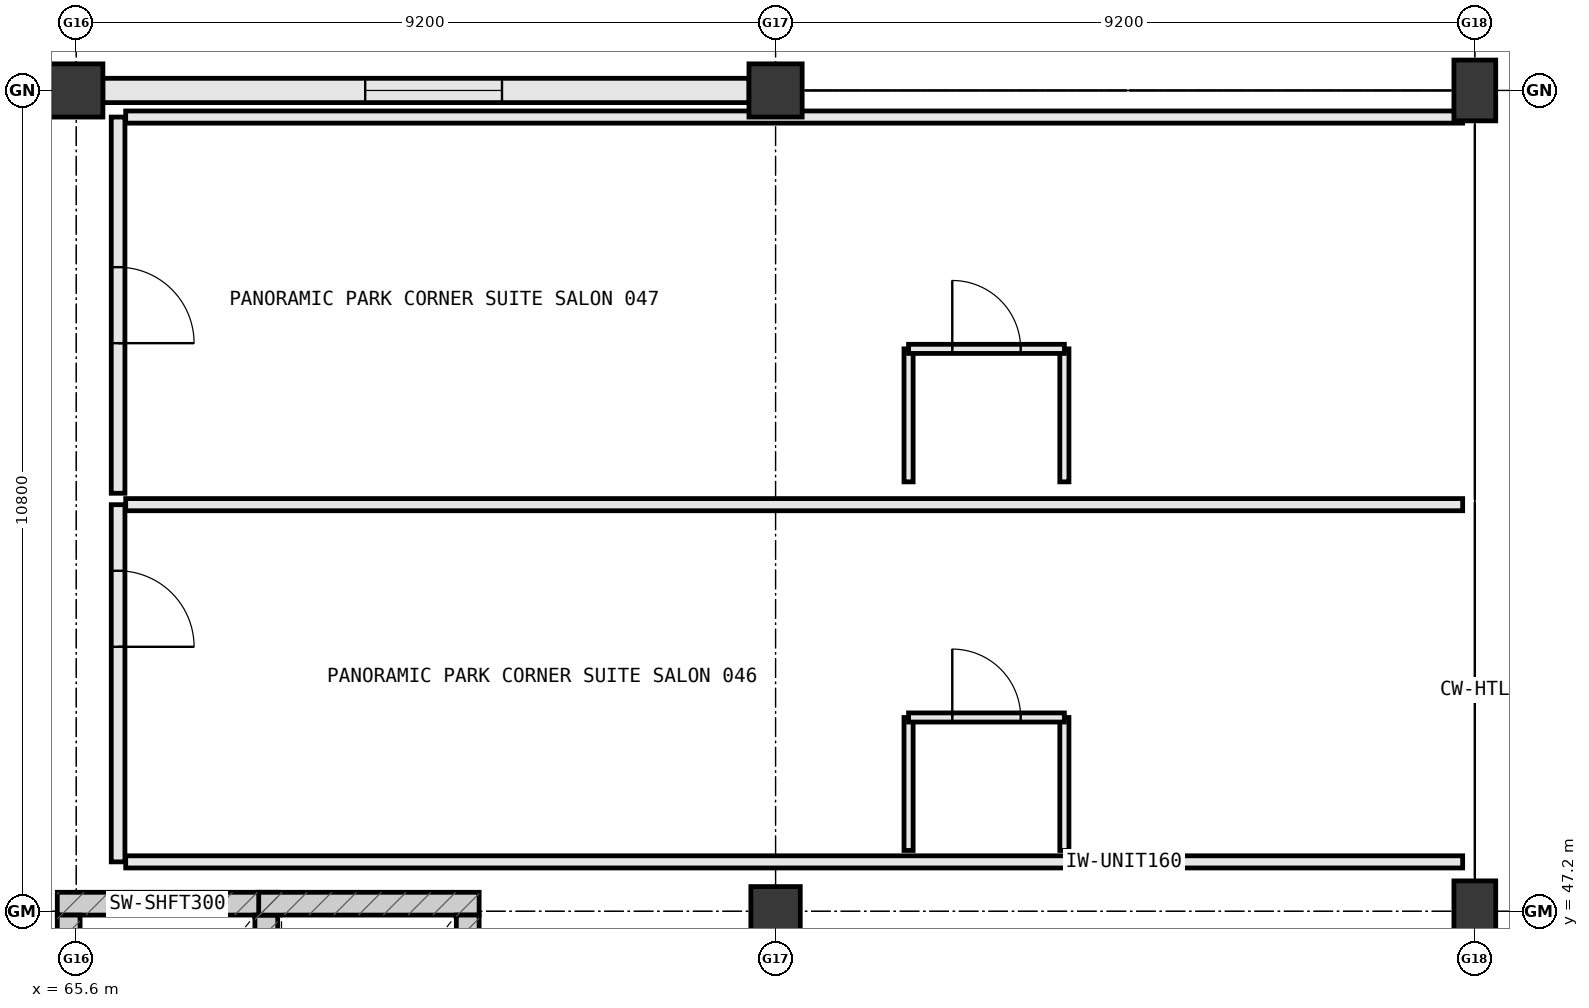
"""IFC4 building model, lengths in metres.
Left out: names, types, materials, properties, quantities, classifications, styles, units other than length and angle.
Written with IfcOpenShell. Run it as: python <this file> out.ifc"""

import sys

from ifc_helpers import new_model, si_unit, direction, frame, frame_2d, origin, origin_2d, place, context, subcontext, project, spatial, rectangle, extrude, element, fill, save


model = new_model("IFC4")
c1 = context("Model", 3, precision=1e-05, world=origin(), true_north=direction((0.0, 1.0)))
c2 = subcontext(c1, "Body", "Model", "MODEL_VIEW")
j1 = project(units=[si_unit("LENGTHUNIT", "METRE"), si_unit("PLANEANGLEUNIT", "RADIAN")], contexts=[c1])
p1 = place(None, origin())
s1 = spatial("IfcSite", under=j1, at=p1, CompositionType="ELEMENT")
p2 = place(p1, origin())
s2 = spatial("IfcBuilding", under=s1, at=p2, CompositionType="ELEMENT")
p3 = place(p2, frame((0.0, 0.0, 10.8)))
s3 = spatial("IfcBuildingStorey", under=s2, at=p3, CompositionType="ELEMENT", Elevation=10.8)
p4 = place(p3, frame((74.8, 47.2, 0.0), z_axis=(0.0, 0.0, 1.0), x_axis=(1.0, 0.0, 0.0)))
e1 = element("IfcColumn", 1, at=p4, inside=s3, PredefinedType="COLUMN", context=c2, shape_type="SweptSolid", body=[
    extrude(rectangle(XDim=0.65, YDim=0.65, at=origin_2d()), origin(), (0.0, 0.0, 1.0), 5.4),
])
p5 = place(p3, frame((74.8, 58.0, 0.0), z_axis=(0.0, 0.0, 1.0), x_axis=(1.0, 0.0, 0.0)))
e2 = element("IfcColumn", 2, at=p5, inside=s3, PredefinedType="COLUMN", context=c2, shape_type="SweptSolid", body=[
    extrude(rectangle(XDim=0.7, YDim=0.7, at=origin_2d()), origin(), (0.0, 0.0, 1.0), 5.4),
])
for number, where, z_axis, x_axis in (
    (3, (84.0, 47.2, 0.0), (0.0, 0.0, 1.0), (1.0, 0.0, 0.0)),
    (4, (84.0, 58.0, 0.0), (0.0, 0.0, 1.0), (1.0, 0.0, 0.0)),
):
    element("IfcColumn", number, at=place(p3, frame(where, z_axis=z_axis, x_axis=x_axis)), inside=s3, PredefinedType="PILASTER", context=c2, shape_type="SweptSolid", body=[
        extrude(rectangle(XDim=0.55, YDim=0.8, at=origin_2d()), origin(), (0.0, 0.0, 1.0), 5.4),
    ])
p6 = place(p3, frame((65.6, 58.0, 0.0), z_axis=(0.0, 0.0, 1.0), x_axis=(1.0, 0.0, 0.0)))
e5 = element("IfcColumn", 5, at=p6, inside=s3, PredefinedType="COLUMN", context=c2, shape_type="SweptSolid", body=[
    extrude(rectangle(XDim=0.7, YDim=0.7, at=origin_2d()), origin(), (0.0, 0.0, 1.0), 5.4),
])
p7 = place(p3, frame((74.452, 58.0, 0.0), z_axis=(0.0, 0.0, 1.0), x_axis=(-1.0, 0.0, 0.0)))
e6 = element("IfcWall", 6, at=p7, inside=s3, PredefinedType="STANDARD", context=c2, shape_type="SweptSolid", body=[
    extrude(rectangle(XDim=8.504, YDim=0.32, at=frame_2d((4.252, 0.0))), origin(), (0.0, 0.0, 1.0), 4.183),
])
p8 = place(p7, frame((3.251, 0.0, 0.85)))
e7 = element("IfcOpeningElement", 7, at=p8, cuts=e6, PredefinedType="OPENING", context=c2, shape_type="SweptSolid", body=[
    extrude(rectangle(XDim=1.8, YDim=1.85, at=frame_2d((0.9, 0.925))), frame((0.0, 0.172, 0.0), z_axis=(0.0, -1.0, 0.0), x_axis=(1.0, 0.0, 0.0)), (0.0, 0.0, 1.0), 0.344),
])
for number, where, z_axis, x_axis in (
    (8, (68.25, 47.3, 0.0), (0.0, 0.0, 1.0), (-1.0, 0.0, 0.0)),
    (9, (68.1, 44.25, 0.0), (0.0, 0.0, 1.0), (0.0, 1.0, 0.0)),
    (10, (65.5, 47.15, 0.0), (0.0, 0.0, 1.0), (0.0, -1.0, 0.0)),
    (11, (70.9, 47.3, 0.0), (0.0, 0.0, 1.0), (-1.0, 0.0, 0.0)),
    (12, (70.75, 44.25, 0.0), (0.0, 0.0, 1.0), (0.0, 1.0, 0.0)),
):
    element("IfcWall", number, at=place(p3, frame(where, z_axis=z_axis, x_axis=x_axis)), inside=s3, PredefinedType="SHEAR", context=c2, shape_type="SweptSolid", body=[
        extrude(rectangle(XDim=2.9, YDim=0.3, at=frame_2d((1.45, 0.0))), origin(), (0.0, 0.0, 1.0), 5.4),
    ])
p9 = place(p3, frame((66.15, 52.55, 0.0), z_axis=(0.0, 0.0, 1.0), x_axis=(0.0, -1.0, 0.0)))
e13 = element("IfcWall", 13, at=p9, inside=s3, PredefinedType="PARTITIONING", context=c2, shape_type="SweptSolid", body=[
    extrude(rectangle(XDim=4.7, YDim=0.18, at=frame_2d((2.35, 0.0))), origin(), (0.0, 0.0, 1.0), 4.8),
])
p10 = place(p9, frame((0.87, 0.0, 0.0)))
e14 = element("IfcOpeningElement", 14, at=p10, cuts=e13, PredefinedType="OPENING", context=c2, shape_type="SweptSolid", body=[
    extrude(rectangle(XDim=1.0, YDim=2.2, at=frame_2d((0.5, 1.1))), frame((0.0, 0.102, 0.0), z_axis=(0.0, -1.0, 0.0), x_axis=(1.0, 0.0, 0.0)), (0.0, 0.0, 1.0), 0.204),
])
for number, where, z_axis, x_axis in (
    (15, (66.25, 47.85, 0.0), (0.0, 0.0, 1.0), (1.0, 0.0, 0.0)),
    (16, (66.25, 52.55, 0.0), (0.0, 0.0, 1.0), (1.0, 0.0, 0.0)),
):
    element("IfcWall", number, at=place(p3, frame(where, z_axis=z_axis, x_axis=x_axis)), inside=s3, PredefinedType="PARTITIONING", context=c2, shape_type="SweptSolid", body=[
        extrude(rectangle(XDim=17.59, YDim=0.16, at=frame_2d((8.795, 0.0))), origin(), (0.0, 0.0, 1.0), 4.8),
    ])
for number, where, z_axis, x_axis in (
    (17, (76.55, 48.0, 0.0), (0.0, 0.0, 1.0), (0.0, 1.0, 0.0)),
    (18, (78.6, 48.0, 0.0), (0.0, 0.0, 1.0), (0.0, 1.0, 0.0)),
):
    element("IfcWall", number, at=place(p3, frame(where, z_axis=z_axis, x_axis=x_axis)), inside=s3, PredefinedType="PARTITIONING", context=c2, shape_type="SweptSolid", body=[
        extrude(rectangle(XDim=1.75, YDim=0.12, at=frame_2d((0.875, 0.0))), origin(), (0.0, 0.0, 1.0), 4.8),
    ])
p11 = place(p3, frame((76.55, 49.75, 0.0), z_axis=(0.0, 0.0, 1.0), x_axis=(1.0, 0.0, 0.0)))
e19 = element("IfcWall", 19, at=p11, inside=s3, PredefinedType="PARTITIONING", context=c2, shape_type="SweptSolid", body=[
    extrude(rectangle(XDim=2.05, YDim=0.12, at=frame_2d((1.025, 0.0))), origin(), (0.0, 0.0, 1.0), 4.8),
])
p12 = place(p11, frame((0.575, 0.0, 0.0)))
e20 = element("IfcOpeningElement", 20, at=p12, cuts=e19, PredefinedType="OPENING", context=c2, shape_type="SweptSolid", body=[
    extrude(rectangle(XDim=0.9, YDim=2.15, at=frame_2d((0.45, 1.075))), frame((0.0, 0.072, 0.0), z_axis=(0.0, -1.0, 0.0), x_axis=(1.0, 0.0, 0.0)), (0.0, 0.0, 1.0), 0.144),
])
p13 = place(p3, frame((66.15, 57.65, 0.0), z_axis=(0.0, 0.0, 1.0), x_axis=(0.0, -1.0, 0.0)))
e21 = element("IfcWall", 21, at=p13, inside=s3, PredefinedType="PARTITIONING", context=c2, shape_type="SweptSolid", body=[
    extrude(rectangle(XDim=4.95, YDim=0.18, at=frame_2d((2.475, 0.0))), origin(), (0.0, 0.0, 1.0), 4.8),
])
p14 = place(p13, frame((1.975, 0.0, 0.0)))
e22 = element("IfcOpeningElement", 22, at=p14, cuts=e21, PredefinedType="OPENING", context=c2, shape_type="SweptSolid", body=[
    extrude(rectangle(XDim=1.0, YDim=2.2, at=frame_2d((0.5, 1.1))), frame((0.0, 0.102, 0.0), z_axis=(0.0, -1.0, 0.0), x_axis=(1.0, 0.0, 0.0)), (0.0, 0.0, 1.0), 0.204),
])
p15 = place(p3, frame((66.25, 57.65, 0.0), z_axis=(0.0, 0.0, 1.0), x_axis=(1.0, 0.0, 0.0)))
e23 = element("IfcWall", 23, at=p15, inside=s3, PredefinedType="PARTITIONING", context=c2, shape_type="SweptSolid", body=[
    extrude(rectangle(XDim=17.59, YDim=0.16, at=frame_2d((8.795, 0.0))), origin(), (0.0, 0.0, 1.0), 4.183),
])
for number, where, z_axis, x_axis in (
    (24, (76.55, 52.85, 0.0), (0.0, 0.0, 1.0), (0.0, 1.0, 0.0)),
    (25, (78.6, 52.85, 0.0), (0.0, 0.0, 1.0), (0.0, 1.0, 0.0)),
):
    element("IfcWall", number, at=place(p3, frame(where, z_axis=z_axis, x_axis=x_axis)), inside=s3, PredefinedType="PARTITIONING", context=c2, shape_type="SweptSolid", body=[
        extrude(rectangle(XDim=1.75, YDim=0.12, at=frame_2d((0.875, 0.0))), origin(), (0.0, 0.0, 1.0), 4.8),
    ])
p16 = place(p3, frame((76.55, 54.6, 0.0), z_axis=(0.0, 0.0, 1.0), x_axis=(1.0, 0.0, 0.0)))
e26 = element("IfcWall", 26, at=p16, inside=s3, PredefinedType="PARTITIONING", context=c2, shape_type="SweptSolid", body=[
    extrude(rectangle(XDim=2.05, YDim=0.12, at=frame_2d((1.025, 0.0))), origin(), (0.0, 0.0, 1.0), 4.8),
])
p17 = place(p16, frame((0.575, 0.0, 0.0)))
e27 = element("IfcOpeningElement", 27, at=p17, cuts=e26, PredefinedType="OPENING", context=c2, shape_type="SweptSolid", body=[
    extrude(rectangle(XDim=0.9, YDim=2.15, at=frame_2d((0.45, 1.075))), frame((0.0, 0.072, 0.0), z_axis=(0.0, -1.0, 0.0), x_axis=(1.0, 0.0, 0.0)), (0.0, 0.0, 1.0), 0.144),
])
p18 = place(p8, origin())
e28 = element("IfcWindow", 28, at=p18, inside=s3, PartitioningType="SINGLE_PANEL", PredefinedType="WINDOW", context=c2, shape_type="SweptSolid", body=[
    extrude(rectangle(XDim=1.8, YDim=1.85, at=frame_2d((0.9, 0.925))), frame((0.0, 0.03, 0.0), z_axis=(0.0, -1.0, 0.0), x_axis=(1.0, 0.0, 0.0)), (0.0, 0.0, 1.0), 0.06),
])
fill(e7, e28)
p19 = place(p10, origin())
e29 = element("IfcDoor", 29, at=p19, inside=s3, OperationType="SINGLE_SWING_RIGHT", PredefinedType="DOOR", context=c2, shape_type="SweptSolid", body=[
    extrude(rectangle(XDim=1.0, YDim=2.2, at=frame_2d((0.5, 1.1))), frame((0.0, 0.025, 0.0), z_axis=(0.0, -1.0, 0.0), x_axis=(1.0, 0.0, 0.0)), (0.0, 0.0, 1.0), 0.05),
])
fill(e14, e29)
p20 = place(p12, origin())
e30 = element("IfcDoor", 30, at=p20, inside=s3, OperationType="SINGLE_SWING_LEFT", PredefinedType="DOOR", context=c2, shape_type="SweptSolid", body=[
    extrude(rectangle(XDim=0.9, YDim=2.15, at=frame_2d((0.45, 1.075))), frame((0.0, 0.025, 0.0), z_axis=(0.0, -1.0, 0.0), x_axis=(1.0, 0.0, 0.0)), (0.0, 0.0, 1.0), 0.05),
])
fill(e20, e30)
p21 = place(p14, origin())
e31 = element("IfcDoor", 31, at=p21, inside=s3, OperationType="SINGLE_SWING_RIGHT", PredefinedType="DOOR", context=c2, shape_type="SweptSolid", body=[
    extrude(rectangle(XDim=1.0, YDim=2.2, at=frame_2d((0.5, 1.1))), frame((0.0, 0.025, 0.0), z_axis=(0.0, -1.0, 0.0), x_axis=(1.0, 0.0, 0.0)), (0.0, 0.0, 1.0), 0.05),
])
fill(e22, e31)
p22 = place(p17, origin())
e32 = element("IfcDoor", 32, at=p22, inside=s3, OperationType="SINGLE_SWING_LEFT", PredefinedType="DOOR", context=c2, shape_type="SweptSolid", body=[
    extrude(rectangle(XDim=0.9, YDim=2.15, at=frame_2d((0.45, 1.075))), frame((0.0, 0.025, 0.0), z_axis=(0.0, -1.0, 0.0), x_axis=(1.0, 0.0, 0.0)), (0.0, 0.0, 1.0), 0.05),
])
fill(e27, e32)
save(model, sys.argv[1])
